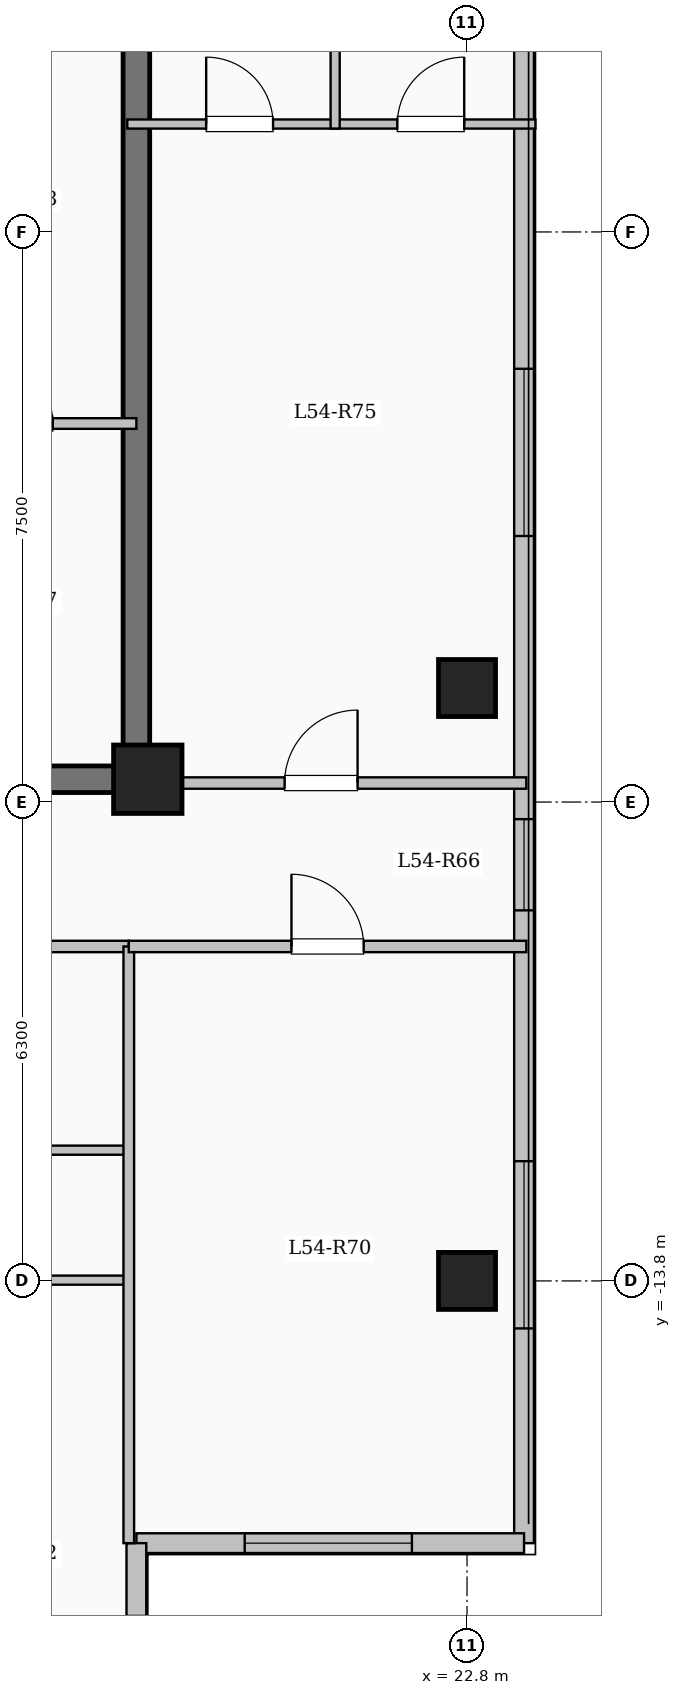
"""IFC4 building model, lengths in metres.
Left out: names, types, materials, properties, quantities, classifications, styles, units other than length and angle.
Written with IfcOpenShell. Run it as: python <this file> out.ifc"""

import sys

from ifc_helpers import new_model, si_unit, direction, frame, frame_2d, origin, origin_2d, place, context, subcontext, project, spatial, rectangle, extrude, element, fill, save


model = new_model("IFC4")
c1 = context("Model", 3, precision=1e-05, world=origin(), true_north=direction((0.0, 1.0)))
c2 = subcontext(c1, "Body", "Model", "MODEL_VIEW")
j1 = project(units=[si_unit("LENGTHUNIT", "METRE"), si_unit("PLANEANGLEUNIT", "RADIAN")], contexts=[c1])
p1 = place(None, origin())
s1 = spatial("IfcSite", under=j1, at=p1, CompositionType="ELEMENT")
p2 = place(p1, origin())
s2 = spatial("IfcBuilding", under=s1, at=p2, CompositionType="ELEMENT")
p3 = place(p2, frame((0.0, 0.0, 200.3)))
s3 = spatial("IfcBuildingStorey", under=s2, at=p3, CompositionType="ELEMENT", Elevation=200.3)
p4 = place(p3, frame((18.6, -7.2, 0.0), z_axis=(0.0, 0.0, 1.0), x_axis=(1.0, 0.0, 0.0)))
e1 = element("IfcColumn", 1, at=p4, inside=s3, PredefinedType="COLUMN", context=c2, shape_type="SweptSolid", body=[
    extrude(rectangle(XDim=0.9, YDim=0.9, at=origin_2d()), origin(), (0.0, 0.0, 1.0), 3.35),
])
for number, where, z_axis, x_axis in (
    (2, (22.8, -13.8, 0.0), (0.0, 0.0, 1.0), (1.0, 0.0, 0.0)),
    (3, (22.8, -6.0, 0.0), (0.0, 0.0, 1.0), (1.0, 0.0, 0.0)),
):
    element("IfcColumn", number, at=place(p3, frame(where, z_axis=z_axis, x_axis=x_axis)), inside=s3, PredefinedType="COLUMN", context=c2, shape_type="SweptSolid", body=[
        extrude(rectangle(XDim=0.75, YDim=0.75, at=origin_2d()), origin(), (0.0, 0.0, 1.0), 3.35),
    ])
p5 = place(p3, frame((23.55, 17.25, 0.0), z_axis=(0.0, 0.0, 1.0), x_axis=(0.0, -1.0, 0.0)))
e4 = element("IfcWall", 4, at=p5, inside=s3, PredefinedType="SOLIDWALL", context=c2, shape_type="SweptSolid", body=[
    extrude(rectangle(XDim=34.5, YDim=0.26, at=frame_2d((17.25, 0.0))), origin(), (0.0, 0.0, 1.0), 3.1),
])
p6 = place(p5, frame((1.375, 0.0, 0.9)))
e5 = element("IfcOpeningElement", 5, at=p6, cuts=e4, PredefinedType="OPENING", context=c2, shape_type="SweptSolid", body=[
    extrude(rectangle(XDim=2.0, YDim=1.7, at=frame_2d((1.0, 0.85))), frame((0.0, 0.14, 0.0), z_axis=(0.0, -1.0, 0.0), x_axis=(1.0, 0.0, 0.0)), (0.0, 0.0, 1.0), 0.28),
])
p7 = place(p5, frame((5.125, 0.0, 0.95)))
e6 = element("IfcOpeningElement", 6, at=p7, cuts=e4, PredefinedType="OPENING", context=c2, shape_type="SweptSolid", body=[
    extrude(rectangle(XDim=1.0, YDim=1.5, at=frame_2d((0.5, 0.75))), frame((0.0, 0.14, 0.0), z_axis=(0.0, -1.0, 0.0), x_axis=(1.0, 0.0, 0.0)), (0.0, 0.0, 1.0), 0.28),
])
p8 = place(p5, frame((8.375, 0.0, 0.9)))
e7 = element("IfcOpeningElement", 7, at=p8, cuts=e4, PredefinedType="OPENING", context=c2, shape_type="SweptSolid", body=[
    extrude(rectangle(XDim=2.0, YDim=1.7, at=frame_2d((1.0, 0.85))), frame((0.0, 0.14, 0.0), z_axis=(0.0, -1.0, 0.0), x_axis=(1.0, 0.0, 0.0)), (0.0, 0.0, 1.0), 0.28),
])
p9 = place(p5, frame((13.2, 0.0, 0.9)))
e8 = element("IfcOpeningElement", 8, at=p9, cuts=e4, PredefinedType="OPENING", context=c2, shape_type="SweptSolid", body=[
    extrude(rectangle(XDim=1.65, YDim=1.6, at=frame_2d((0.825, 0.8))), frame((0.0, 0.14, 0.0), z_axis=(0.0, -1.0, 0.0), x_axis=(1.0, 0.0, 0.0)), (0.0, 0.0, 1.0), 0.28),
])
p10 = place(p5, frame((19.05, 0.0, 0.9)))
e9 = element("IfcOpeningElement", 9, at=p10, cuts=e4, PredefinedType="OPENING", context=c2, shape_type="SweptSolid", body=[
    extrude(rectangle(XDim=2.2, YDim=1.75, at=frame_2d((1.1, 0.875))), frame((0.0, 0.14, 0.0), z_axis=(0.0, -1.0, 0.0), x_axis=(1.0, 0.0, 0.0)), (0.0, 0.0, 1.0), 0.28),
])
p11 = place(p5, frame((24.975, 0.0, 0.95)))
e10 = element("IfcOpeningElement", 10, at=p11, cuts=e4, PredefinedType="OPENING", context=c2, shape_type="SweptSolid", body=[
    extrude(rectangle(XDim=1.2, YDim=1.5, at=frame_2d((0.6, 0.75))), frame((0.0, 0.14, 0.0), z_axis=(0.0, -1.0, 0.0), x_axis=(1.0, 0.0, 0.0)), (0.0, 0.0, 1.0), 0.28),
])
p12 = place(p5, frame((29.475, 0.0, 0.9)))
e11 = element("IfcOpeningElement", 11, at=p12, cuts=e4, PredefinedType="OPENING", context=c2, shape_type="SweptSolid", body=[
    extrude(rectangle(XDim=2.2, YDim=1.75, at=frame_2d((1.1, 0.875))), frame((0.0, 0.14, 0.0), z_axis=(0.0, -1.0, 0.0), x_axis=(1.0, 0.0, 0.0)), (0.0, 0.0, 1.0), 0.28),
])
p13 = place(p3, frame((23.55, -17.25, 0.0), z_axis=(0.0, 0.0, 1.0), x_axis=(-1.0, 0.0, 0.0)))
e12 = element("IfcWall", 12, at=p13, inside=s3, PredefinedType="SOLIDWALL", context=c2, shape_type="SweptSolid", body=[
    extrude(rectangle(XDim=5.1, YDim=0.26, at=frame_2d((2.55, 0.0))), origin(), (0.0, 0.0, 1.0), 3.1),
])
p14 = place(p13, frame((1.475, 0.0, 0.9)))
e13 = element("IfcOpeningElement", 13, at=p14, cuts=e12, PredefinedType="OPENING", context=c2, shape_type="SweptSolid", body=[
    extrude(rectangle(XDim=2.2, YDim=1.75, at=frame_2d((1.1, 0.875))), frame((0.0, 0.14, 0.0), z_axis=(0.0, -1.0, 0.0), x_axis=(1.0, 0.0, 0.0)), (0.0, 0.0, 1.0), 0.28),
])
p15 = place(p3, frame((18.45, -17.25, 0.0), z_axis=(0.0, 0.0, 1.0), x_axis=(0.0, -1.0, 0.0)))
e14 = element("IfcWall", 14, at=p15, inside=s3, PredefinedType="SOLIDWALL", context=c2, shape_type="SweptSolid", body=[
    extrude(rectangle(XDim=3.6, YDim=0.26, at=frame_2d((1.8, 0.0))), origin(), (0.0, 0.0, 1.0), 3.1),
])
p16 = place(p15, frame((0.958, 0.0, 0.9)))
e15 = element("IfcOpeningElement", 15, at=p16, cuts=e14, PredefinedType="OPENING", context=c2, shape_type="SweptSolid", body=[
    extrude(rectangle(XDim=1.65, YDim=1.6, at=frame_2d((0.825, 0.8))), frame((0.0, 0.14, 0.0), z_axis=(0.0, -1.0, 0.0), x_axis=(1.0, 0.0, 0.0)), (0.0, 0.0, 1.0), 0.28),
])
p17 = place(p3, frame((18.45, -7.375, 0.0), z_axis=(0.0, 0.0, 1.0), x_axis=(0.0, 1.0, 0.0)))
e16 = element("IfcWall", 16, at=p17, inside=s3, PredefinedType="SHEAR", context=c2, shape_type="SweptSolid", body=[
    extrude(rectangle(XDim=14.05, YDim=0.35, at=frame_2d((7.025, 0.0))), origin(), (0.0, 0.0, 1.0), 3.35),
])
p18 = place(p3, frame((12.625, -7.2, 0.0), z_axis=(0.0, 0.0, 1.0), x_axis=(1.0, 0.0, 0.0)))
e17 = element("IfcWall", 17, at=p18, inside=s3, PredefinedType="SHEAR", context=c2, shape_type="SweptSolid", body=[
    extrude(rectangle(XDim=6.0, YDim=0.35, at=frame_2d((3.0, 0.0))), origin(), (0.0, 0.0, 1.0), 3.35),
])
p19 = place(p3, frame((15.4, -2.52, 0.0), z_axis=(0.0, 0.0, 1.0), x_axis=(1.0, 0.0, 0.0)))
e18 = element("IfcWall", 18, at=p19, inside=s3, PredefinedType="PARTITIONING", context=c2, shape_type="SweptSolid", body=[
    extrude(rectangle(XDim=3.05, YDim=0.14, at=frame_2d((1.525, 0.0))), origin(), (0.0, 0.0, 1.0), 3.1),
])
p20 = place(p19, frame((1.05, 0.0, 0.0)))
e19 = element("IfcOpeningElement", 19, at=p20, cuts=e18, PredefinedType="OPENING", context=c2, shape_type="SweptSolid", body=[
    extrude(rectangle(XDim=0.9, YDim=2.08, at=frame_2d((0.45, 1.04))), frame((0.0, 0.08, 0.0), z_axis=(0.0, -1.0, 0.0), x_axis=(1.0, 0.0, 0.0)), (0.0, 0.0, 1.0), 0.16),
])
p21 = place(p3, frame((8.55, -9.4, 0.0), z_axis=(0.0, 0.0, 1.0), x_axis=(1.0, 0.0, 0.0)))
e20 = element("IfcWall", 20, at=p21, inside=s3, PredefinedType="PARTITIONING", context=c2, shape_type="SweptSolid", body=[
    extrude(rectangle(XDim=9.8, YDim=0.15, at=frame_2d((4.9, 0.0))), origin(), (0.0, 0.0, 1.0), 3.1),
])
p22 = place(p21, frame((0.9, 0.0, 0.0)))
e21 = element("IfcOpeningElement", 21, at=p22, cuts=e20, PredefinedType="OPENING", context=c2, shape_type="SweptSolid", body=[
    extrude(rectangle(XDim=0.96, YDim=2.15, at=frame_2d((0.48, 1.075))), frame((0.0, 0.085, 0.0), z_axis=(0.0, -1.0, 0.0), x_axis=(1.0, 0.0, 0.0)), (0.0, 0.0, 1.0), 0.17),
])
p23 = place(p3, frame((15.343, -12.08, 0.0), z_axis=(0.0, 0.0, 1.0), x_axis=(1.0, 0.0, 0.0)))
e22 = element("IfcWall", 22, at=p23, inside=s3, PredefinedType="PARTITIONING", context=c2, shape_type="SweptSolid", body=[
    extrude(rectangle(XDim=3.007, YDim=0.12, at=frame_2d((1.503, 0.0))), origin(), (0.0, 0.0, 1.0), 3.1),
])
p24 = place(p23, frame((1.064, 0.0, 0.0)))
e23 = element("IfcOpeningElement", 23, at=p24, cuts=e22, PredefinedType="OPENING", context=c2, shape_type="SweptSolid", body=[
    extrude(rectangle(XDim=0.88, YDim=2.1, at=frame_2d((0.44, 1.05))), frame((0.0, 0.07, 0.0), z_axis=(0.0, -1.0, 0.0), x_axis=(1.0, 0.0, 0.0)), (0.0, 0.0, 1.0), 0.14),
])
p25 = place(p3, frame((12.452, -13.79, 0.0), z_axis=(0.0, 0.0, 1.0), x_axis=(1.0, 0.0, 0.0)))
e24 = element("IfcWall", 24, at=p25, inside=s3, PredefinedType="PARTITIONING", context=c2, shape_type="SweptSolid", body=[
    extrude(rectangle(XDim=5.958, YDim=0.12, at=frame_2d((2.979, 0.0))), origin(), (0.0, 0.0, 1.0), 2.725),
])
p26 = place(p25, frame((1.005, 0.0, 0.0)))
e25 = element("IfcOpeningElement", 25, at=p26, cuts=e24, PredefinedType="OPENING", context=c2, shape_type="SweptSolid", body=[
    extrude(rectangle(XDim=0.88, YDim=2.1, at=frame_2d((0.44, 1.05))), frame((0.0, 0.07, 0.0), z_axis=(0.0, -1.0, 0.0), x_axis=(1.0, 0.0, 0.0)), (0.0, 0.0, 1.0), 0.14),
])
p27 = place(p25, frame((3.894, 0.0, 0.0)))
e26 = element("IfcOpeningElement", 26, at=p27, cuts=e24, PredefinedType="OPENING", context=c2, shape_type="SweptSolid", body=[
    extrude(rectangle(XDim=0.88, YDim=2.1, at=frame_2d((0.44, 1.05))), frame((0.0, 0.07, 0.0), z_axis=(0.0, -1.0, 0.0), x_axis=(1.0, 0.0, 0.0)), (0.0, 0.0, 1.0), 0.14),
])
p28 = place(p3, frame((18.45, -7.25, 0.0), z_axis=(0.0, 0.0, 1.0), x_axis=(1.0, 0.0, 0.0)))
e27 = element("IfcWall", 27, at=p28, inside=s3, PredefinedType="PARTITIONING", context=c2, shape_type="SweptSolid", body=[
    extrude(rectangle(XDim=5.13, YDim=0.15, at=frame_2d((2.565, 0.0))), origin(), (0.0, 0.0, 1.0), 3.1),
])
p29 = place(p28, frame((1.95, 0.0, 0.0)))
e28 = element("IfcOpeningElement", 28, at=p29, cuts=e27, PredefinedType="OPENING", context=c2, shape_type="SweptSolid", body=[
    extrude(rectangle(XDim=0.96, YDim=2.15, at=frame_2d((0.48, 1.075))), frame((0.0, 0.085, 0.0), z_axis=(0.0, -1.0, 0.0), x_axis=(1.0, 0.0, 0.0)), (0.0, 0.0, 1.0), 0.17),
])
p30 = place(p3, frame((18.35, -17.25, 0.0), z_axis=(0.0, 0.0, 1.0), x_axis=(0.0, 1.0, 0.0)))
e29 = element("IfcWall", 29, at=p30, inside=s3, PredefinedType="PARTITIONING", context=c2, shape_type="SweptSolid", body=[
    extrude(rectangle(XDim=7.85, YDim=0.14, at=frame_2d((3.925, 0.0))), origin(), (0.0, 0.0, 1.0), 3.1),
])
p31 = place(p3, frame((18.35, -9.4, 0.0), z_axis=(0.0, 0.0, 1.0), x_axis=(1.0, 0.0, 0.0)))
e30 = element("IfcWall", 30, at=p31, inside=s3, PredefinedType="PARTITIONING", context=c2, shape_type="SweptSolid", body=[
    extrude(rectangle(XDim=5.23, YDim=0.15, at=frame_2d((2.615, 0.0))), origin(), (0.0, 0.0, 1.0), 3.1),
])
p32 = place(p31, frame((2.14, 0.0, 0.0)))
e31 = element("IfcOpeningElement", 31, at=p32, cuts=e30, PredefinedType="OPENING", context=c2, shape_type="SweptSolid", body=[
    extrude(rectangle(XDim=0.95, YDim=2.15, at=frame_2d((0.475, 1.075))), frame((0.0, 0.085, 0.0), z_axis=(0.0, -1.0, 0.0), x_axis=(1.0, 0.0, 0.0)), (0.0, 0.0, 1.0), 0.17),
])
p33 = place(p3, frame((18.33, 1.42, 0.0), z_axis=(0.0, 0.0, 1.0), x_axis=(1.0, 0.0, 0.0)))
e32 = element("IfcWall", 32, at=p33, inside=s3, PredefinedType="PARTITIONING", context=c2, shape_type="SweptSolid", body=[
    extrude(rectangle(XDim=5.37, YDim=0.12, at=frame_2d((2.685, 0.0))), origin(), (0.0, 0.0, 1.0), 3.1),
])
p34 = place(p33, frame((1.038, 0.0, 0.0)))
e33 = element("IfcOpeningElement", 33, at=p34, cuts=e32, PredefinedType="OPENING", context=c2, shape_type="SweptSolid", body=[
    extrude(rectangle(XDim=0.88, YDim=2.1, at=frame_2d((0.44, 1.05))), frame((0.0, 0.07, 0.0), z_axis=(0.0, -1.0, 0.0), x_axis=(1.0, 0.0, 0.0)), (0.0, 0.0, 1.0), 0.14),
])
p35 = place(p33, frame((3.553, 0.0, 0.0)))
e34 = element("IfcOpeningElement", 34, at=p35, cuts=e32, PredefinedType="OPENING", context=c2, shape_type="SweptSolid", body=[
    extrude(rectangle(XDim=0.88, YDim=2.1, at=frame_2d((0.44, 1.05))), frame((0.0, 0.07, 0.0), z_axis=(0.0, -1.0, 0.0), x_axis=(1.0, 0.0, 0.0)), (0.0, 0.0, 1.0), 0.14),
])
p36 = place(p3, frame((21.065, 1.36, 0.0), z_axis=(0.0, 0.0, 1.0), x_axis=(0.0, 1.0, 0.0)))
e35 = element("IfcWall", 35, at=p36, inside=s3, PredefinedType="PARTITIONING", context=c2, shape_type="SweptSolid", body=[
    extrude(rectangle(XDim=3.58, YDim=0.12, at=frame_2d((1.79, 0.0))), origin(), (0.0, 0.0, 1.0), 3.1),
])
p37 = place(p10, origin())
e36 = element("IfcWindow", 36, at=p37, inside=s3, PartitioningType="SINGLE_PANEL", PredefinedType="WINDOW", context=c2, shape_type="SweptSolid", body=[
    extrude(rectangle(XDim=2.2, YDim=1.75, at=frame_2d((1.1, 0.875))), frame((0.0, 0.03, 0.0), z_axis=(0.0, -1.0, 0.0), x_axis=(1.0, 0.0, 0.0)), (0.0, 0.0, 1.0), 0.06),
])
fill(e9, e36)
p38 = place(p11, origin())
e37 = element("IfcWindow", 37, at=p38, inside=s3, PartitioningType="SINGLE_PANEL", PredefinedType="WINDOW", context=c2, shape_type="SweptSolid", body=[
    extrude(rectangle(XDim=1.2, YDim=1.5, at=frame_2d((0.6, 0.75))), frame((0.0, 0.03, 0.0), z_axis=(0.0, -1.0, 0.0), x_axis=(1.0, 0.0, 0.0)), (0.0, 0.0, 1.0), 0.06),
])
fill(e10, e37)
p39 = place(p12, origin())
e38 = element("IfcWindow", 38, at=p39, inside=s3, PartitioningType="SINGLE_PANEL", PredefinedType="WINDOW", context=c2, shape_type="SweptSolid", body=[
    extrude(rectangle(XDim=2.2, YDim=1.75, at=frame_2d((1.1, 0.875))), frame((0.0, 0.03, 0.0), z_axis=(0.0, -1.0, 0.0), x_axis=(1.0, 0.0, 0.0)), (0.0, 0.0, 1.0), 0.06),
])
fill(e11, e38)
p40 = place(p14, origin())
e39 = element("IfcWindow", 39, at=p40, inside=s3, PartitioningType="SINGLE_PANEL", PredefinedType="WINDOW", context=c2, shape_type="SweptSolid", body=[
    extrude(rectangle(XDim=2.2, YDim=1.75, at=frame_2d((1.1, 0.875))), frame((0.0, 0.03, 0.0), z_axis=(0.0, -1.0, 0.0), x_axis=(1.0, 0.0, 0.0)), (0.0, 0.0, 1.0), 0.06),
])
fill(e13, e39)
p41 = place(p32, origin())
e40 = element("IfcDoor", 40, at=p41, inside=s3, OperationType="SINGLE_SWING_LEFT", PredefinedType="DOOR", context=c2, shape_type="SweptSolid", body=[
    extrude(rectangle(XDim=0.95, YDim=2.15, at=frame_2d((0.475, 1.075))), frame((0.0, 0.025, 0.0), z_axis=(0.0, -1.0, 0.0), x_axis=(1.0, 0.0, 0.0)), (0.0, 0.0, 1.0), 0.05),
])
fill(e31, e40)
p42 = place(p29, origin())
e41 = element("IfcDoor", 41, at=p42, inside=s3, OperationType="SINGLE_SWING_RIGHT", PredefinedType="DOOR", context=c2, shape_type="SweptSolid", body=[
    extrude(rectangle(XDim=0.96, YDim=2.15, at=frame_2d((0.48, 1.075))), frame((0.0, 0.025, 0.0), z_axis=(0.0, -1.0, 0.0), x_axis=(1.0, 0.0, 0.0)), (0.0, 0.0, 1.0), 0.05),
])
fill(e28, e41)
p43 = place(p34, origin())
e42 = element("IfcDoor", 42, at=p43, inside=s3, OperationType="SINGLE_SWING_LEFT", PredefinedType="DOOR", context=c2, shape_type="SweptSolid", body=[
    extrude(rectangle(XDim=0.88, YDim=2.1, at=frame_2d((0.44, 1.05))), frame((0.0, 0.025, 0.0), z_axis=(0.0, -1.0, 0.0), x_axis=(1.0, 0.0, 0.0)), (0.0, 0.0, 1.0), 0.05),
])
fill(e33, e42)
p44 = place(p35, origin())
e43 = element("IfcDoor", 43, at=p44, inside=s3, OperationType="SINGLE_SWING_RIGHT", PredefinedType="DOOR", context=c2, shape_type="SweptSolid", body=[
    extrude(rectangle(XDim=0.88, YDim=2.1, at=frame_2d((0.44, 1.05))), frame((0.0, 0.025, 0.0), z_axis=(0.0, -1.0, 0.0), x_axis=(1.0, 0.0, 0.0)), (0.0, 0.0, 1.0), 0.05),
])
fill(e34, e43)
save(model, sys.argv[1])
